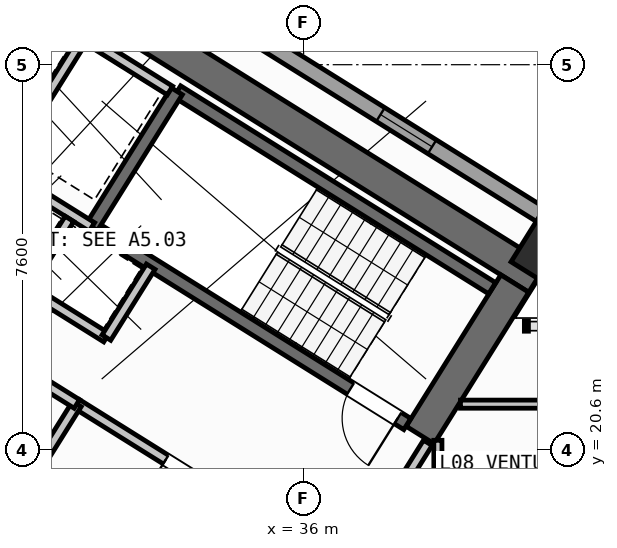
"""IFC4 building model, lengths in metres.
Left out: names, types, materials, properties, quantities, classifications, styles, units other than length and angle.
Written with IfcOpenShell. Run it as: python <this file> out.ifc"""

import sys

from ifc_helpers import new_model, si_unit, direction, frame, frame_2d, origin, origin_2d, place, context, subcontext, project, spatial, rectangle, hollow_rectangle, extrude, source, transform, mapped, element, fill, save


model = new_model("IFC4")
c1 = context("Model", 3, precision=1e-05, world=origin(), true_north=direction((0.0, 1.0)))
c2 = subcontext(c1, "Body", "Model", "MODEL_VIEW")
j1 = project(units=[si_unit("LENGTHUNIT", "METRE"), si_unit("PLANEANGLEUNIT", "RADIAN")], contexts=[c1])
p1 = place(None, origin())
s1 = spatial("IfcSite", under=j1, at=p1, CompositionType="ELEMENT")
p2 = place(p1, origin())
s2 = spatial("IfcBuilding", under=s1, at=p2, CompositionType="ELEMENT")
p3 = place(p2, frame((0.0, 0.0, 34.8)))
s3 = spatial("IfcBuildingStorey", under=s2, at=p3, CompositionType="ELEMENT", Elevation=34.8)
p4 = place(p3, frame((40.615, 23.983, 0.0), z_axis=(0.0, 0.0, 1.0), x_axis=(-0.848045953968, 0.529922692436, 0.0)))
e1 = element("IfcWall", 1, at=p4, inside=s3, PredefinedType="SHEAR", context=c2, shape_type="SweptSolid", body=[
    extrude(rectangle(XDim=13.24, YDim=0.65, at=frame_2d((6.62, 0.0))), origin(), (0.0, 0.0, 1.0), 3.35),
])
p5 = place(p3, frame((40.168, 23.88, 0.0), z_axis=(0.0, 0.0, 1.0), x_axis=(-0.529893103397, -0.8480644427, 0.0)))
e2 = element("IfcWall", 2, at=p5, inside=s3, PredefinedType="SHEAR", context=c2, shape_type="SweptSolid", body=[
    extrude(rectangle(XDim=3.525, YDim=0.65, at=frame_2d((1.763, 0.0))), origin(), (0.0, 0.0, 1.0), 3.35),
])
m1 = source(origin(), c2, "Body", "SweptSolid", [
    extrude(hollow_rectangle(XDim=1.0, YDim=1.0, WallThickness=0.04, at=origin_2d()), origin(), (0.0, 0.0, 1.0), 3.6),
])
p6 = place(p3, frame((40.783, 24.469, 0.0), z_axis=(0.0, 0.0, 1.0), x_axis=(-0.848048096156, 0.529919264233, 0.0)))
e3 = element("IfcColumn", 3, at=p6, inside=s3, PredefinedType="COLUMN", context=c2, shape_type="MappedRepresentation", body=[
    mapped(m1, transform((0.0, 0.0, 0.0), scale=1.0)),
])
p7 = place(p3, frame((14.138, 41.825, 0.0), z_axis=(0.0, 0.0, 1.0), x_axis=(0.848046498049, -0.529921821731, 0.0)))
e4 = element("IfcWall", 4, at=p7, inside=s3, PredefinedType="STANDARD", context=c2, shape_type="SweptSolid", body=[
    extrude(rectangle(XDim=31.588, YDim=0.32, at=frame_2d((15.794, 0.0))), origin(), (0.0, 0.0, 1.0), 3.35),
])
p8 = place(p7, frame((3.369, 0.0, 0.0)))
e5 = element("IfcOpeningElement", 5, at=p8, cuts=e4, PredefinedType="OPENING", context=c2, shape_type="SweptSolid", body=[
    extrude(rectangle(XDim=1.05, YDim=2.15, at=frame_2d((0.525, 1.075))), frame((0.0, 0.17, 0.0), z_axis=(0.0, -1.0, 0.0), x_axis=(1.0, 0.0, 0.0)), (0.0, 0.0, 1.0), 0.34),
])
p9 = place(p7, frame((0.946, 0.0, 0.85)))
e6 = element("IfcOpeningElement", 6, at=p9, cuts=e4, PredefinedType="OPENING", context=c2, shape_type="SweptSolid", body=[
    extrude(rectangle(XDim=1.8, YDim=1.5, at=frame_2d((0.9, 0.75))), frame((0.0, 0.17, 0.0), z_axis=(0.0, -1.0, 0.0), x_axis=(1.0, 0.0, 0.0)), (0.0, 0.0, 1.0), 0.34),
])
p10 = place(p7, frame((8.46, 0.0, 0.85)))
e7 = element("IfcOpeningElement", 7, at=p10, cuts=e4, PredefinedType="OPENING", context=c2, shape_type="SweptSolid", body=[
    extrude(rectangle(XDim=1.8, YDim=1.5, at=frame_2d((0.9, 0.75))), frame((0.0, 0.17, 0.0), z_axis=(0.0, -1.0, 0.0), x_axis=(1.0, 0.0, 0.0)), (0.0, 0.0, 1.0), 0.34),
])
p11 = place(p7, frame((13.899, 0.0, 0.85)))
e8 = element("IfcOpeningElement", 8, at=p11, cuts=e4, PredefinedType="OPENING", context=c2, shape_type="SweptSolid", body=[
    extrude(rectangle(XDim=1.5, YDim=1.5, at=frame_2d((0.75, 0.75))), frame((0.0, 0.17, 0.0), z_axis=(0.0, -1.0, 0.0), x_axis=(1.0, 0.0, 0.0)), (0.0, 0.0, 1.0), 0.34),
])
p12 = place(p7, frame((22.019, 0.0, 0.95)))
e9 = element("IfcOpeningElement", 9, at=p12, cuts=e4, PredefinedType="OPENING", context=c2, shape_type="SweptSolid", body=[
    extrude(rectangle(XDim=1.2, YDim=1.4, at=frame_2d((0.6, 0.7))), frame((0.0, 0.17, 0.0), z_axis=(0.0, -1.0, 0.0), x_axis=(1.0, 0.0, 0.0)), (0.0, 0.0, 1.0), 0.34),
])
p13 = place(p7, frame((27.569, 0.0, 0.95)))
e10 = element("IfcOpeningElement", 10, at=p13, cuts=e4, PredefinedType="OPENING", context=c2, shape_type="SweptSolid", body=[
    extrude(rectangle(XDim=1.2, YDim=1.4, at=frame_2d((0.6, 0.7))), frame((0.0, 0.17, 0.0), z_axis=(0.0, -1.0, 0.0), x_axis=(1.0, 0.0, 0.0)), (0.0, 0.0, 1.0), 0.34),
])
p14 = place(p3, frame((31.28, 18.261, 0.0), z_axis=(0.0, 0.0, 1.0), x_axis=(-0.848051618787, 0.529913626805, 0.0)))
e11 = element("IfcWall", 11, at=p14, inside=s3, PredefinedType="SHEAR", context=c2, shape_type="SweptSolid", body=[
    extrude(rectangle(XDim=7.46, YDim=0.26, at=frame_2d((3.73, 0.0))), origin(), (0.0, 0.0, 1.0), 3.35),
])
p15 = place(p14, frame((0.36, 0.0, 0.0)))
e12 = element("IfcOpeningElement", 12, at=p15, cuts=e11, PredefinedType="OPENING", context=c2, shape_type="SweptSolid", body=[
    extrude(rectangle(XDim=0.86, YDim=2.05, at=frame_2d((0.43, 1.025))), frame((0.0, 0.14, 0.0), z_axis=(0.0, -1.0, 0.0), x_axis=(1.0, 0.0, 0.0)), (0.0, 0.0, 1.0), 0.28),
])
p16 = place(p3, frame((39.721, 23.788, 0.0), z_axis=(0.0, 0.0, 1.0), x_axis=(-0.848054434086, 0.529909121291, 0.0)))
e13 = element("IfcWall", 13, at=p16, inside=s3, PredefinedType="SHEAR", context=c2, shape_type="SweptSolid", body=[
    extrude(rectangle(XDim=7.33, YDim=0.26, at=frame_2d((3.665, 0.0))), origin(), (0.0, 0.0, 1.0), 3.35),
])
p17 = place(p3, frame((38.046, 21.108, 0.0), z_axis=(0.0, 0.0, 1.0), x_axis=(-0.848054434086, 0.529909121291, 0.0)))
e14 = element("IfcWall", 14, at=p17, inside=s3, PredefinedType="SHEAR", context=c2, shape_type="SweptSolid", body=[
    extrude(rectangle(XDim=7.33, YDim=0.26, at=frame_2d((3.665, 0.0))), origin(), (0.0, 0.0, 1.0), 3.35),
])
p18 = place(p17, frame((0.22, 0.0, 0.0)))
e15 = element("IfcOpeningElement", 15, at=p18, cuts=e14, PredefinedType="OPENING", context=c2, shape_type="SweptSolid", body=[
    extrude(rectangle(XDim=1.1, YDim=2.1, at=frame_2d((0.55, 1.05))), frame((0.0, 0.14, 0.0), z_axis=(0.0, -1.0, 0.0), x_axis=(1.0, 0.0, 0.0)), (0.0, 0.0, 1.0), 0.28),
])
p19 = place(p3, frame((33.496, 27.677, 0.0), z_axis=(0.0, 0.0, 1.0), x_axis=(-0.529908658664, -0.84805472316, 0.0)))
e16 = element("IfcWall", 16, at=p19, inside=s3, PredefinedType="SHEAR", context=c2, shape_type="SweptSolid", body=[
    extrude(rectangle(XDim=3.16, YDim=0.26, at=frame_2d((1.58, 0.0))), origin(), (0.0, 0.0, 1.0), 3.35),
])
p20 = place(p3, frame((36.374, 18.474, 0.0), z_axis=(0.0, 0.0, 1.0), x_axis=(-0.848051071577, 0.529914502535, 0.0)))
e17 = element("IfcWall", 17, at=p20, inside=s3, PredefinedType="STANDARD", context=c2, shape_type="SweptSolid", body=[
    extrude(rectangle(XDim=5.718, YDim=0.2, at=frame_2d((2.859, 0.0))), origin(), (0.0, 0.0, 1.0), 3.34),
])
p21 = place(p20, frame((2.498, 0.0, 0.0)))
e18 = element("IfcOpeningElement", 18, at=p21, cuts=e17, PredefinedType="OPENING", context=c2, shape_type="SweptSolid", body=[
    extrude(rectangle(XDim=1.15, YDim=2.1, at=frame_2d((0.575, 1.05))), frame((0.0, 0.11, 0.0), z_axis=(0.0, -1.0, 0.0), x_axis=(1.0, 0.0, 0.0)), (0.0, 0.0, 1.0), 0.22),
])
p22 = place(p3, frame((31.822, 24.998, 0.0), z_axis=(0.0, 0.0, 1.0), x_axis=(-0.848058348634, 0.529902856485, 0.0)))
e19 = element("IfcWall", 19, at=p22, inside=s3, PredefinedType="STANDARD", context=c2, shape_type="SweptSolid", body=[
    extrude(rectangle(XDim=4.568, YDim=0.2, at=frame_2d((2.284, 0.0))), origin(), (0.0, 0.0, 1.0), 3.34),
])
p23 = place(p3, frame((32.108, 22.814, 0.0), z_axis=(0.0, 0.0, 1.0), x_axis=(-0.848042229521, 0.529928652696, 0.0)))
e20 = element("IfcWall", 20, at=p23, inside=s3, PredefinedType="STANDARD", context=c2, shape_type="SweptSolid", body=[
    extrude(rectangle(XDim=5.62, YDim=0.2, at=frame_2d((2.81, 0.0))), origin(), (0.0, 0.0, 1.0), 3.34),
])
p24 = place(p3, frame((32.982, 24.213, 0.0), z_axis=(0.0, 0.0, 1.0), x_axis=(-0.529839334948, -0.84809803628, 0.0)))
e21 = element("IfcWall", 21, at=p24, inside=s3, PredefinedType="STANDARD", context=c2, shape_type="SweptSolid", body=[
    extrude(rectangle(XDim=1.65, YDim=0.2, at=frame_2d((0.825, 0.0))), origin(), (0.0, 0.0, 1.0), 3.34),
])
p25 = place(p3, frame((31.645, 28.716, 0.0), z_axis=(0.0, 0.0, 1.0), x_axis=(-0.52986693015, -0.848080795876, 0.0)))
e22 = element("IfcWall", 22, at=p25, inside=s3, PredefinedType="STANDARD", context=c2, shape_type="SweptSolid", body=[
    extrude(rectangle(XDim=2.66, YDim=0.2, at=frame_2d((1.33, 0.0))), origin(), (0.0, 0.0, 1.0), 3.34),
])
p26 = place(p3, frame((33.363, 27.69, 0.0), z_axis=(0.0, 0.0, 1.0), x_axis=(-0.848053806312, 0.529910125964, 0.0)))
e23 = element("IfcWall", 23, at=p26, inside=s3, PredefinedType="STANDARD", context=c2, shape_type="SweptSolid", body=[
    extrude(rectangle(XDim=4.448, YDim=0.2, at=frame_2d((2.224, 0.0))), origin(), (0.0, 0.0, 1.0), 3.34),
])
p27 = place(p3, frame((31.379, 25.156, 0.0), z_axis=(0.0, 0.0, 1.0), x_axis=(-0.529998940003, -0.847998304005, 0.0)))
e24 = element("IfcWall", 24, at=p27, inside=s3, PredefinedType="STANDARD", context=c2, shape_type="SweptSolid", body=[
    extrude(rectangle(XDim=1.58, YDim=0.2, at=frame_2d((0.79, 0.0))), origin(), (0.0, 0.0, 1.0), 3.34),
])
p28 = place(p3, frame((31.525, 21.504, 0.0), z_axis=(0.0, 0.0, 1.0), x_axis=(-0.529907497854, -0.848055448493, 0.0)))
e25 = element("IfcWall", 25, at=p28, inside=s3, PredefinedType="STANDARD", context=c2, shape_type="SweptSolid", body=[
    extrude(rectangle(XDim=2.88, YDim=0.2, at=frame_2d((1.44, 0.0))), origin(), (0.0, 0.0, 1.0), 3.34),
])
p29 = place(p3, frame((31.525, 21.504, 0.0), z_axis=(0.0, 0.0, 1.0), x_axis=(-0.848044998614, 0.529924221305, 0.0)))
e26 = element("IfcWall", 26, at=p29, inside=s3, PredefinedType="STANDARD", context=c2, shape_type="SweptSolid", body=[
    extrude(rectangle(XDim=6.168, YDim=0.2, at=frame_2d((3.084, 0.0))), origin(), (0.0, 0.0, 1.0), 3.34),
])
p30 = place(p29, frame((4.4, 0.0, 0.0)))
e27 = element("IfcOpeningElement", 27, at=p30, cuts=e26, PredefinedType="OPENING", context=c2, shape_type="SweptSolid", body=[
    extrude(rectangle(XDim=0.86, YDim=2.05, at=frame_2d((0.43, 1.025))), frame((0.0, 0.11, 0.0), z_axis=(0.0, -1.0, 0.0), x_axis=(1.0, 0.0, 0.0)), (0.0, 0.0, 1.0), 0.22),
])
p31 = place(p29, frame((1.45, 0.0, 0.0)))
e28 = element("IfcOpeningElement", 28, at=p31, cuts=e26, PredefinedType="OPENING", context=c2, shape_type="SweptSolid", body=[
    extrude(rectangle(XDim=0.86, YDim=2.05, at=frame_2d((0.43, 1.025))), frame((0.0, 0.11, 0.0), z_axis=(0.0, -1.0, 0.0), x_axis=(1.0, 0.0, 0.0)), (0.0, 0.0, 1.0), 0.22),
])
p32 = place(p3, frame((38.451, 20.737, 0.0), z_axis=(0.0, 0.0, 1.0), x_axis=(-0.529924799939, -0.848044637038, 0.0)))
e29 = element("IfcWall", 29, at=p32, inside=s3, PredefinedType="STANDARD", context=c2, shape_type="SweptSolid", body=[
    extrude(rectangle(XDim=2.96, YDim=0.2, at=frame_2d((1.48, 0.0))), origin(), (0.0, 0.0, 1.0), 3.34),
])
p33 = place(p32, frame((1.46, 0.0, 0.0)))
e30 = element("IfcOpeningElement", 30, at=p33, cuts=e29, PredefinedType="OPENING", context=c2, shape_type="SweptSolid", body=[
    extrude(rectangle(XDim=0.86, YDim=2.05, at=frame_2d((0.43, 1.025))), frame((0.0, 0.11, 0.0), z_axis=(0.0, -1.0, 0.0), x_axis=(1.0, 0.0, 0.0)), (0.0, 0.0, 1.0), 0.22),
])
p34 = place(p3, frame((38.65, 17.93, 0.0), z_axis=(0.0, 0.0, 1.0), x_axis=(0.0, 1.0, 0.0)))
e31 = element("IfcWall", 31, at=p34, inside=s3, PredefinedType="PARTITIONING", context=c2, shape_type="SweptSolid", body=[
    extrude(rectangle(XDim=2.857, YDim=0.16, at=frame_2d((1.428, 0.0))), origin(), (0.0, 0.0, 1.0), 3.34),
])
p35 = place(p3, frame((39.095, 21.5, 0.0), z_axis=(0.0, 0.0, 1.0), x_axis=(1.0, 0.0, 0.0)))
e32 = element("IfcWall", 32, at=p35, inside=s3, PredefinedType="PARTITIONING", context=c2, shape_type="SweptSolid", body=[
    extrude(rectangle(XDim=7.094, YDim=0.16, at=frame_2d((3.547, 0.0))), origin(), (0.0, 0.0, 1.0), 3.34),
])
m2 = source(origin(), c2, "Body", "SweptSolid", [
    extrude(rectangle(XDim=1.2, YDim=1.4, at=frame_2d((0.6, 0.7))), frame((0.0, 0.03, 0.0), z_axis=(0.0, -1.0, 0.0), x_axis=(1.0, 0.0, 0.0)), (0.0, 0.0, 1.0), 0.06),
])
p36 = place(p13, origin())
e33 = element("IfcWindow", 33, at=p36, inside=s3, PartitioningType="SINGLE_PANEL", PredefinedType="WINDOW", context=c2, shape_type="MappedRepresentation", body=[
    mapped(m2, transform((0.0, 0.0, 0.0), scale=1.0)),
])
fill(e10, e33)
m3 = source(origin(), c2, "Body", "SweptSolid", [
    extrude(rectangle(XDim=1.1, YDim=2.1, at=frame_2d((0.55, 1.05))), frame((0.0, 0.025, 0.0), z_axis=(0.0, -1.0, 0.0), x_axis=(1.0, 0.0, 0.0)), (0.0, 0.0, 1.0), 0.05),
])
p37 = place(p18, origin())
e34 = element("IfcDoor", 34, at=p37, inside=s3, OperationType="SINGLE_SWING_LEFT", PredefinedType="DOOR", context=c2, shape_type="MappedRepresentation", body=[
    mapped(m3, transform((0.0, 0.0, 0.0), scale=1.0)),
])
fill(e15, e34)
m4 = source(origin(), c2, "Body", "SweptSolid", [
    extrude(rectangle(XDim=1.15, YDim=2.1, at=frame_2d((0.575, 1.05))), frame((0.0, 0.025, 0.0), z_axis=(0.0, -1.0, 0.0), x_axis=(1.0, 0.0, 0.0)), (0.0, 0.0, 1.0), 0.05),
])
p38 = place(p21, origin())
e35 = element("IfcDoor", 35, at=p38, inside=s3, OperationType="SINGLE_SWING_RIGHT", PredefinedType="DOOR", context=c2, shape_type="MappedRepresentation", body=[
    mapped(m4, transform((0.0, 0.0, 0.0), scale=1.0)),
])
fill(e18, e35)
save(model, sys.argv[1])
